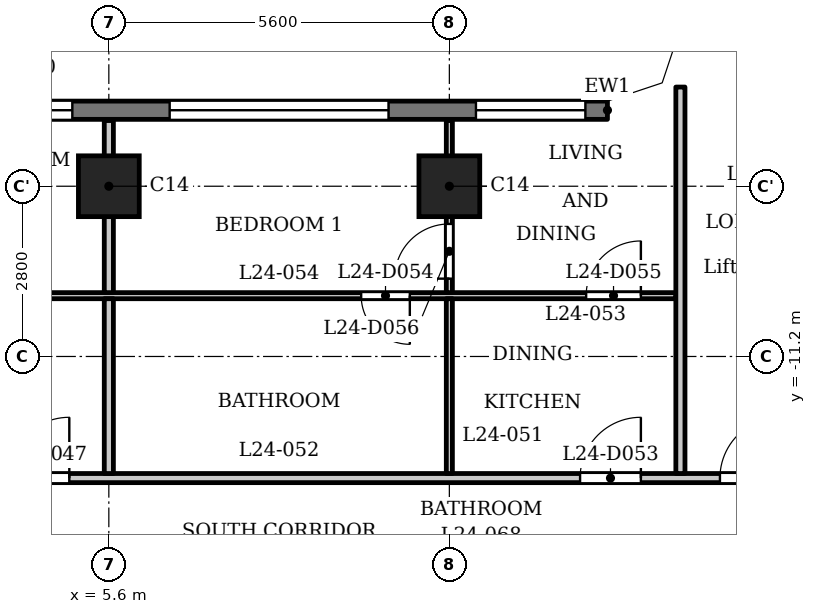
"""IFC4 building model, lengths in metres.
Left out: names, types, materials, properties, quantities, classifications, styles, units other than length and angle.
Written with IfcOpenShell. Run it as: python <this file> out.ifc"""

import sys

from ifc_helpers import new_model, si_unit, direction, frame, frame_2d, origin, origin_2d, place, context, subcontext, project, spatial, polyline, rectangle, outline, extrude, element, fill, save


model = new_model("IFC4")
c1 = context("Model", 3, precision=1e-05, world=origin(), true_north=direction((0.0, 1.0)))
c2 = subcontext(c1, "Body", "Model", "MODEL_VIEW")
j1 = project(units=[si_unit("LENGTHUNIT", "METRE"), si_unit("PLANEANGLEUNIT", "RADIAN")], contexts=[c1])
p1 = place(None, origin())
s1 = spatial("IfcSite", under=j1, at=p1, CompositionType="ELEMENT")
p2 = place(p1, origin())
s2 = spatial("IfcBuilding", under=s1, at=p2, CompositionType="ELEMENT")
p3 = place(p2, frame((0.0, 0.0, 97.3)))
s3 = spatial("IfcBuildingStorey", under=s2, at=p3, CompositionType="ELEMENT", Elevation=97.3)
for number, where, z_axis, x_axis in (
    (1, (5.6, -8.4, 0.0), (0.0, 0.0, 1.0), (1.0, 0.0, 0.0)),
    (2, (11.2, -8.4, 0.0), (0.0, 0.0, 1.0), (1.0, 0.0, 0.0)),
):
    element("IfcColumn", number, at=place(p3, frame(where, z_axis=z_axis, x_axis=x_axis)), inside=s3, PredefinedType="COLUMN", context=c2, shape_type="SweptSolid", body=[
        extrude(rectangle(XDim=1.0, YDim=1.0, at=origin_2d()), origin(), (0.0, 0.0, 1.0), 3.5),
    ])
p4 = place(p3, frame((13.8, -7.15, 0.0), z_axis=(0.0, 0.0, 1.0), x_axis=(-1.0, 0.0, 0.0)))
e3 = element("IfcWall", 3, at=p4, inside=s3, PredefinedType="SOLIDWALL", context=c2, shape_type="SweptSolid", body=[
    extrude(rectangle(XDim=27.6, YDim=0.3, at=frame_2d((13.8, 0.0))), origin(), (0.0, 0.0, 1.0), 3.2),
])
p5 = place(p4, frame((0.363, 0.0, 0.9)))
e4 = element("IfcOpeningElement", 4, at=p5, cuts=e3, PredefinedType="OPENING", context=c2, shape_type="SweptSolid", body=[
    extrude(rectangle(XDim=1.8, YDim=1.25, at=frame_2d((0.9, 0.625))), frame((0.0, 0.16, 0.0), z_axis=(0.0, -1.0, 0.0), x_axis=(1.0, 0.0, 0.0)), (0.0, 0.0, 1.0), 0.32),
])
p6 = place(p4, frame((3.6, 0.0, 1.2)))
e5 = element("IfcOpeningElement", 5, at=p6, cuts=e3, PredefinedType="OPENING", context=c2, shape_type="SweptSolid", body=[
    extrude(rectangle(XDim=3.6, YDim=0.95, at=frame_2d((1.8, 0.475))), frame((0.0, 0.16, 0.0), z_axis=(0.0, -1.0, 0.0), x_axis=(1.0, 0.0, 0.0)), (0.0, 0.0, 1.0), 0.32),
])
p7 = place(p4, frame((8.8, 0.0, 0.9)))
e6 = element("IfcOpeningElement", 6, at=p7, cuts=e3, PredefinedType="OPENING", context=c2, shape_type="SweptSolid", body=[
    extrude(rectangle(XDim=1.8, YDim=1.25, at=frame_2d((0.9, 0.625))), frame((0.0, 0.16, 0.0), z_axis=(0.0, -1.0, 0.0), x_axis=(1.0, 0.0, 0.0)), (0.0, 0.0, 1.0), 0.32),
])
p8 = place(p4, frame((11.6, 0.0, 0.9)))
e7 = element("IfcOpeningElement", 7, at=p8, cuts=e3, PredefinedType="OPENING", context=c2, shape_type="SweptSolid", body=[
    extrude(rectangle(XDim=1.8, YDim=1.25, at=frame_2d((0.9, 0.625))), frame((0.0, 0.16, 0.0), z_axis=(0.0, -1.0, 0.0), x_axis=(1.0, 0.0, 0.0)), (0.0, 0.0, 1.0), 0.32),
])
p9 = place(p4, frame((14.8, 0.0, 1.2)))
e8 = element("IfcOpeningElement", 8, at=p9, cuts=e3, PredefinedType="OPENING", context=c2, shape_type="SweptSolid", body=[
    extrude(rectangle(XDim=3.6, YDim=0.95, at=frame_2d((1.8, 0.475))), frame((0.0, 0.16, 0.0), z_axis=(0.0, -1.0, 0.0), x_axis=(1.0, 0.0, 0.0)), (0.0, 0.0, 1.0), 0.32),
])
p10 = place(p4, frame((20.4, 0.0, 1.2)))
e9 = element("IfcOpeningElement", 9, at=p10, cuts=e3, PredefinedType="OPENING", context=c2, shape_type="SweptSolid", body=[
    extrude(rectangle(XDim=3.6, YDim=0.95, at=frame_2d((1.8, 0.475))), frame((0.0, 0.16, 0.0), z_axis=(0.0, -1.0, 0.0), x_axis=(1.0, 0.0, 0.0)), (0.0, 0.0, 1.0), 0.32),
])
p11 = place(p4, frame((25.438, 0.0, 0.9)))
e10 = element("IfcOpeningElement", 10, at=p11, cuts=e3, PredefinedType="OPENING", context=c2, shape_type="SweptSolid", body=[
    extrude(rectangle(XDim=1.8, YDim=1.25, at=frame_2d((0.9, 0.625))), frame((0.0, 0.16, 0.0), z_axis=(0.0, -1.0, 0.0), x_axis=(1.0, 0.0, 0.0)), (0.0, 0.0, 1.0), 0.32),
])
p12 = place(p3, frame((-17.4, -13.2, 0.0), z_axis=(0.0, 0.0, 1.0), x_axis=(1.0, 0.0, 0.0)))
e11 = element("IfcWall", 11, at=p12, inside=s3, PredefinedType="PARTITIONING", context=c2, shape_type="SweptSolid", body=[
    extrude(rectangle(XDim=34.8, YDim=0.15, at=frame_2d((17.4, 0.0))), origin(), (0.0, 0.0, 1.0), 3.2),
])
p13 = place(p12, frame((0.65, 0.0, 0.0)))
e12 = element("IfcOpeningElement", 12, at=p13, cuts=e11, PredefinedType="OPENING", context=c2, shape_type="SweptSolid", body=[
    extrude(rectangle(XDim=1.0, YDim=2.1, at=frame_2d((0.5, 1.05))), frame((0.0, 0.085, 0.0), z_axis=(0.0, -1.0, 0.0), x_axis=(1.0, 0.0, 0.0)), (0.0, 0.0, 1.0), 0.17),
])
p14 = place(p12, frame((33.05, 0.0, 0.0)))
e13 = element("IfcOpeningElement", 13, at=p14, cuts=e11, PredefinedType="OPENING", context=c2, shape_type="SweptSolid", body=[
    extrude(rectangle(XDim=1.0, YDim=2.1, at=frame_2d((0.5, 1.05))), frame((0.0, 0.085, 0.0), z_axis=(0.0, -1.0, 0.0), x_axis=(1.0, 0.0, 0.0)), (0.0, 0.0, 1.0), 0.17),
])
p15 = place(p12, frame((4.55, 0.0, 0.0)))
e14 = element("IfcOpeningElement", 14, at=p15, cuts=e11, PredefinedType="OPENING", context=c2, shape_type="SweptSolid", body=[
    extrude(rectangle(XDim=1.0, YDim=2.1, at=frame_2d((0.5, 1.05))), frame((0.0, 0.085, 0.0), z_axis=(0.0, -1.0, 0.0), x_axis=(1.0, 0.0, 0.0)), (0.0, 0.0, 1.0), 0.17),
])
p16 = place(p12, frame((21.35, 0.0, 0.0)))
e15 = element("IfcOpeningElement", 15, at=p16, cuts=e11, PredefinedType="OPENING", context=c2, shape_type="SweptSolid", body=[
    extrude(rectangle(XDim=1.0, YDim=2.1, at=frame_2d((0.5, 1.05))), frame((0.0, 0.085, 0.0), z_axis=(0.0, -1.0, 0.0), x_axis=(1.0, 0.0, 0.0)), (0.0, 0.0, 1.0), 0.17),
])
p17 = place(p12, frame((30.75, 0.0, 0.0)))
e16 = element("IfcOpeningElement", 16, at=p17, cuts=e11, PredefinedType="OPENING", context=c2, shape_type="SweptSolid", body=[
    extrude(rectangle(XDim=1.0, YDim=2.1, at=frame_2d((0.5, 1.05))), frame((0.0, 0.085, 0.0), z_axis=(0.0, -1.0, 0.0), x_axis=(1.0, 0.0, 0.0)), (0.0, 0.0, 1.0), 0.17),
])
p18 = place(p3, frame((-14.925, -10.2, 0.0), z_axis=(0.0, 0.0, 1.0), x_axis=(1.0, 0.0, 0.0)))
e17 = element("IfcWall", 17, at=p18, inside=s3, PredefinedType="PARTITIONING", context=c2, shape_type="SweptSolid", body=[
    extrude(rectangle(XDim=29.85, YDim=0.1, at=frame_2d((14.925, 0.0))), origin(), (0.0, 0.0, 1.0), 3.2),
])
p19 = place(p18, frame((7.875, 0.0, 0.0)))
e18 = element("IfcOpeningElement", 18, at=p19, cuts=e17, PredefinedType="OPENING", context=c2, shape_type="SweptSolid", body=[
    extrude(rectangle(XDim=0.8, YDim=2.1, at=frame_2d((0.4, 1.05))), frame((0.0, 0.06, 0.0), z_axis=(0.0, -1.0, 0.0), x_axis=(1.0, 0.0, 0.0)), (0.0, 0.0, 1.0), 0.12),
])
p20 = place(p18, frame((2.175, 0.0, 0.0)))
e19 = element("IfcOpeningElement", 19, at=p20, cuts=e17, PredefinedType="OPENING", context=c2, shape_type="SweptSolid", body=[
    extrude(rectangle(XDim=0.9, YDim=2.1, at=frame_2d((0.45, 1.05))), frame((0.0, 0.06, 0.0), z_axis=(0.0, -1.0, 0.0), x_axis=(1.0, 0.0, 0.0)), (0.0, 0.0, 1.0), 0.12),
])
p21 = place(p18, frame((9.975, 0.0, 0.0)))
e20 = element("IfcOpeningElement", 20, at=p21, cuts=e17, PredefinedType="OPENING", context=c2, shape_type="SweptSolid", body=[
    extrude(rectangle(XDim=0.8, YDim=2.1, at=frame_2d((0.4, 1.05))), frame((0.0, 0.06, 0.0), z_axis=(0.0, -1.0, 0.0), x_axis=(1.0, 0.0, 0.0)), (0.0, 0.0, 1.0), 0.12),
])
p22 = place(p18, frame((12.125, 0.0, 0.0)))
e21 = element("IfcOpeningElement", 21, at=p22, cuts=e17, PredefinedType="OPENING", context=c2, shape_type="SweptSolid", body=[
    extrude(rectangle(XDim=0.9, YDim=2.1, at=frame_2d((0.45, 1.05))), frame((0.0, 0.06, 0.0), z_axis=(0.0, -1.0, 0.0), x_axis=(1.0, 0.0, 0.0)), (0.0, 0.0, 1.0), 0.12),
])
p23 = place(p18, frame((15.975, 0.0, 0.0)))
e22 = element("IfcOpeningElement", 22, at=p23, cuts=e17, PredefinedType="OPENING", context=c2, shape_type="SweptSolid", body=[
    extrude(rectangle(XDim=0.9, YDim=2.1, at=frame_2d((0.45, 1.05))), frame((0.0, 0.06, 0.0), z_axis=(0.0, -1.0, 0.0), x_axis=(1.0, 0.0, 0.0)), (0.0, 0.0, 1.0), 0.12),
])
p24 = place(p18, frame((18.225, 0.0, 0.0)))
e23 = element("IfcOpeningElement", 23, at=p24, cuts=e17, PredefinedType="OPENING", context=c2, shape_type="SweptSolid", body=[
    extrude(rectangle(XDim=0.9, YDim=2.1, at=frame_2d((0.45, 1.05))), frame((0.0, 0.06, 0.0), z_axis=(0.0, -1.0, 0.0), x_axis=(1.0, 0.0, 0.0)), (0.0, 0.0, 1.0), 0.12),
])
p25 = place(p18, frame((24.675, 0.0, 0.0)))
e24 = element("IfcOpeningElement", 24, at=p25, cuts=e17, PredefinedType="OPENING", context=c2, shape_type="SweptSolid", body=[
    extrude(rectangle(XDim=0.8, YDim=2.1, at=frame_2d((0.4, 1.05))), frame((0.0, 0.06, 0.0), z_axis=(0.0, -1.0, 0.0), x_axis=(1.0, 0.0, 0.0)), (0.0, 0.0, 1.0), 0.12),
])
p26 = place(p18, frame((28.375, 0.0, 0.0)))
e25 = element("IfcOpeningElement", 25, at=p26, cuts=e17, PredefinedType="OPENING", context=c2, shape_type="SweptSolid", body=[
    extrude(rectangle(XDim=0.9, YDim=2.1, at=frame_2d((0.45, 1.05))), frame((0.0, 0.06, 0.0), z_axis=(0.0, -1.0, 0.0), x_axis=(1.0, 0.0, 0.0)), (0.0, 0.0, 1.0), 0.12),
])
p27 = place(p3, frame((5.6, -13.125, 0.0), z_axis=(0.0, 0.0, 1.0), x_axis=(0.0, 1.0, 0.0)))
e26 = element("IfcWall", 26, at=p27, inside=s3, PredefinedType="PARTITIONING", context=c2, shape_type="SweptSolid", body=[
    extrude(rectangle(XDim=2.875, YDim=0.15, at=frame_2d((1.438, 0.0))), origin(), (0.0, 0.0, 1.0), 3.2),
])
p28 = place(p3, frame((5.6, -10.15, 0.0), z_axis=(0.0, 0.0, 1.0), x_axis=(0.0, 1.0, 0.0)))
e27 = element("IfcWall", 27, at=p28, inside=s3, PredefinedType="PARTITIONING", context=c2, shape_type="SweptSolid", body=[
    extrude(rectangle(XDim=2.83, YDim=0.15, at=frame_2d((1.415, 0.0))), origin(), (0.0, 0.0, 1.0), 3.2),
])
p29 = place(p3, frame((11.2, -13.125, 0.0), z_axis=(0.0, 0.0, 1.0), x_axis=(0.0, 1.0, 0.0)))
e28 = element("IfcWall", 28, at=p29, inside=s3, PredefinedType="PARTITIONING", context=c2, shape_type="SweptSolid", body=[
    extrude(rectangle(XDim=2.875, YDim=0.1, at=frame_2d((1.438, 0.0))), origin(), (0.0, 0.0, 1.0), 3.2),
])
p30 = place(p3, frame((11.2, -10.15, 0.0), z_axis=(0.0, 0.0, 1.0), x_axis=(0.0, 1.0, 0.0)))
e29 = element("IfcWall", 29, at=p30, inside=s3, PredefinedType="PARTITIONING", context=c2, shape_type="SweptSolid", body=[
    extrude(rectangle(XDim=2.83, YDim=0.1, at=frame_2d((1.415, 0.0))), origin(), (0.0, 0.0, 1.0), 3.2),
])
p31 = place(p30, frame((0.23, 0.0, 0.0)))
e30 = element("IfcOpeningElement", 30, at=p31, cuts=e29, PredefinedType="OPENING", context=c2, shape_type="SweptSolid", body=[
    extrude(rectangle(XDim=0.9, YDim=2.1, at=frame_2d((0.45, 1.05))), frame((0.0, 0.06, 0.0), z_axis=(0.0, -1.0, 0.0), x_axis=(1.0, 0.0, 0.0)), (0.0, 0.0, 1.0), 0.12),
])
p32 = place(p3, frame((15.0, -13.125, 0.0), z_axis=(0.0, 0.0, 1.0), x_axis=(0.0, 1.0, 0.0)))
e31 = element("IfcWall", 31, at=p32, inside=s3, PredefinedType="PARTITIONING", context=c2, shape_type="SweptSolid", body=[
    extrude(rectangle(XDim=6.356, YDim=0.15, at=frame_2d((3.178, 0.0))), origin(), (0.0, 0.0, 1.0), 3.2),
])
p33 = place(p3, origin())
e32 = element("IfcWall", 32, at=p33, inside=s3, PredefinedType="SOLIDWALL", context=c2, shape_type="SweptSolid", body=[
    extrude(outline(polyline([(14.937, -6.937), (15.3, -5.849), (15.3, -5.8), (15.0, -5.8), (14.7, -6.7), (13.8, -7.0), (13.8, -7.3), (13.849, -7.3), (14.937, -6.937)])), origin(), (0.0, 0.0, 1.0), 3.2),
])
p34 = place(p14, origin())
e33 = element("IfcDoor", 33, at=p34, inside=s3, OperationType="SINGLE_SWING_LEFT", PredefinedType="DOOR", context=c2, shape_type="SweptSolid", body=[
    extrude(rectangle(XDim=1.0, YDim=2.1, at=frame_2d((0.5, 1.05))), frame((0.0, 0.025, 0.0), z_axis=(0.0, -1.0, 0.0), x_axis=(1.0, 0.0, 0.0)), (0.0, 0.0, 1.0), 0.05),
])
fill(e13, e33)
p35 = place(p16, origin())
e34 = element("IfcDoor", 34, at=p35, inside=s3, OperationType="SINGLE_SWING_LEFT", PredefinedType="DOOR", context=c2, shape_type="SweptSolid", body=[
    extrude(rectangle(XDim=1.0, YDim=2.1, at=frame_2d((0.5, 1.05))), frame((0.0, 0.025, 0.0), z_axis=(0.0, -1.0, 0.0), x_axis=(1.0, 0.0, 0.0)), (0.0, 0.0, 1.0), 0.05),
])
fill(e15, e34)
p36 = place(p17, origin())
e35 = element("IfcDoor", 35, at=p36, inside=s3, OperationType="SINGLE_SWING_LEFT", PredefinedType="DOOR", context=c2, shape_type="SweptSolid", body=[
    extrude(rectangle(XDim=1.0, YDim=2.1, at=frame_2d((0.5, 1.05))), frame((0.0, 0.025, 0.0), z_axis=(0.0, -1.0, 0.0), x_axis=(1.0, 0.0, 0.0)), (0.0, 0.0, 1.0), 0.05),
])
fill(e16, e35)
p37 = place(p25, origin())
e36 = element("IfcDoor", 36, at=p37, inside=s3, OperationType="SINGLE_SWING_RIGHT", PredefinedType="DOOR", context=c2, shape_type="SweptSolid", body=[
    extrude(rectangle(XDim=0.8, YDim=2.1, at=frame_2d((0.4, 1.05))), frame((0.0, 0.025, 0.0), z_axis=(0.0, -1.0, 0.0), x_axis=(1.0, 0.0, 0.0)), (0.0, 0.0, 1.0), 0.05),
])
fill(e24, e36)
p38 = place(p26, origin())
e37 = element("IfcDoor", 37, at=p38, inside=s3, OperationType="SINGLE_SWING_LEFT", PredefinedType="DOOR", context=c2, shape_type="SweptSolid", body=[
    extrude(rectangle(XDim=0.9, YDim=2.1, at=frame_2d((0.45, 1.05))), frame((0.0, 0.025, 0.0), z_axis=(0.0, -1.0, 0.0), x_axis=(1.0, 0.0, 0.0)), (0.0, 0.0, 1.0), 0.05),
])
fill(e25, e37)
p39 = place(p31, origin())
e38 = element("IfcDoor", 38, at=p39, inside=s3, OperationType="SINGLE_SWING_RIGHT", PredefinedType="DOOR", context=c2, shape_type="SweptSolid", body=[
    extrude(rectangle(XDim=0.9, YDim=2.1, at=frame_2d((0.45, 1.05))), frame((0.0, 0.025, 0.0), z_axis=(0.0, -1.0, 0.0), x_axis=(1.0, 0.0, 0.0)), (0.0, 0.0, 1.0), 0.05),
])
fill(e30, e38)
p40 = place(p5, origin())
e39 = element("IfcWindow", 39, at=p40, inside=s3, PartitioningType="SINGLE_PANEL", PredefinedType="WINDOW", context=c2, shape_type="SweptSolid", body=[
    extrude(rectangle(XDim=1.8, YDim=1.25, at=frame_2d((0.9, 0.625))), frame((0.0, 0.03, 0.0), z_axis=(0.0, -1.0, 0.0), x_axis=(1.0, 0.0, 0.0)), (0.0, 0.0, 1.0), 0.06),
])
fill(e4, e39)
p41 = place(p6, origin())
e40 = element("IfcWindow", 40, at=p41, inside=s3, PartitioningType="SINGLE_PANEL", PredefinedType="WINDOW", context=c2, shape_type="SweptSolid", body=[
    extrude(rectangle(XDim=3.6, YDim=0.95, at=frame_2d((1.8, 0.475))), frame((0.0, 0.03, 0.0), z_axis=(0.0, -1.0, 0.0), x_axis=(1.0, 0.0, 0.0)), (0.0, 0.0, 1.0), 0.06),
])
fill(e5, e40)
p42 = place(p7, origin())
e41 = element("IfcWindow", 41, at=p42, inside=s3, PartitioningType="SINGLE_PANEL", PredefinedType="WINDOW", context=c2, shape_type="SweptSolid", body=[
    extrude(rectangle(XDim=1.8, YDim=1.25, at=frame_2d((0.9, 0.625))), frame((0.0, 0.03, 0.0), z_axis=(0.0, -1.0, 0.0), x_axis=(1.0, 0.0, 0.0)), (0.0, 0.0, 1.0), 0.06),
])
fill(e6, e41)
save(model, sys.argv[1])
